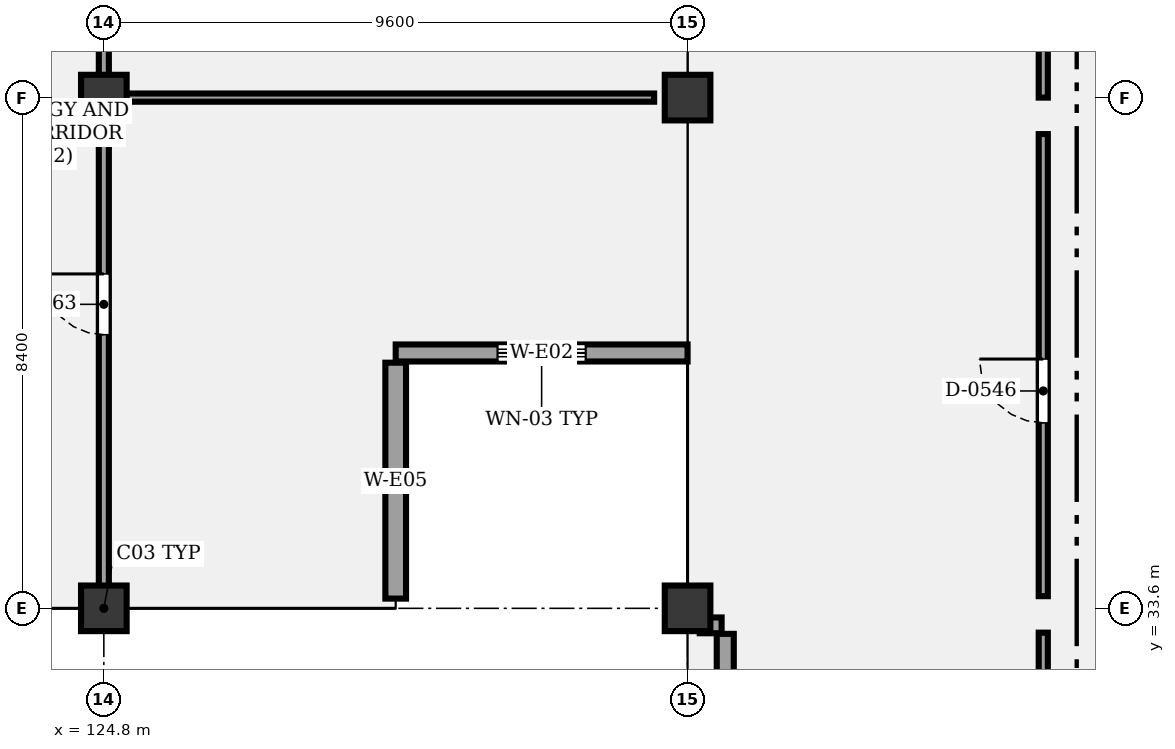
"""IFC4 building model, lengths in metres.
Left out: names, types, materials, properties, quantities, classifications, styles, units other than length and angle.
Written with IfcOpenShell. Run it as: python <this file> out.ifc"""

import sys

from ifc_helpers import new_model, si_unit, direction, frame, frame_2d, origin, origin_2d, place, context, subcontext, project, spatial, rectangle, extrude, element, fill, save


model = new_model("IFC4")
c1 = context("Model", 3, precision=1e-05, world=origin(), true_north=direction((0.0, 1.0)))
c2 = subcontext(c1, "Body", "Model", "MODEL_VIEW")
j1 = project(units=[si_unit("LENGTHUNIT", "METRE"), si_unit("PLANEANGLEUNIT", "RADIAN")], contexts=[c1])
p1 = place(None, origin())
s1 = spatial("IfcSite", under=j1, at=p1, CompositionType="ELEMENT")
p2 = place(p1, origin())
s2 = spatial("IfcBuilding", under=s1, at=p2, CompositionType="ELEMENT")
p3 = place(p2, frame((0.0, 0.0, 9.9)))
s3 = spatial("IfcBuildingStorey", under=s2, at=p3, CompositionType="ELEMENT", Elevation=9.9)
for number, where, z_axis, x_axis in (
    (1, (124.8, 33.6, 0.0), (0.0, 0.0, 1.0), (1.0, 0.0, 0.0)),
    (2, (124.8, 42.0, 0.0), (0.0, 0.0, 1.0), (1.0, 0.0, 0.0)),
    (3, (134.4, 33.6, 0.0), (0.0, 0.0, 1.0), (1.0, 0.0, 0.0)),
    (4, (134.4, 42.0, 0.0), (0.0, 0.0, 1.0), (1.0, 0.0, 0.0)),
):
    element("IfcColumn", number, at=place(p3, frame(where, z_axis=z_axis, x_axis=x_axis)), inside=s3, PredefinedType="COLUMN", context=c2, shape_type="SweptSolid", body=[
        extrude(rectangle(XDim=0.75, YDim=0.75, at=origin_2d()), origin(), (0.0, 0.0, 1.0), 3.6),
    ])
p4 = place(p3, frame((134.4, 37.8, 0.0), z_axis=(0.0, 0.0, 1.0), x_axis=(-1.0, 0.0, 0.0)))
e5 = element("IfcWall", 5, at=p4, inside=s3, PredefinedType="SOLIDWALL", context=c2, shape_type="SweptSolid", body=[
    extrude(rectangle(XDim=4.8, YDim=0.28, at=frame_2d((2.4, 0.0))), origin(), (0.0, 0.0, 1.0), 2.57),
])
p5 = place(p4, frame((1.675, 0.0, 0.85)))
e6 = element("IfcOpeningElement", 6, at=p5, cuts=e5, PredefinedType="OPENING", context=c2, shape_type="SweptSolid", body=[
    extrude(rectangle(XDim=1.45, YDim=1.2, at=frame_2d((0.725, 0.6))), frame((0.0, 0.15, 0.0), z_axis=(0.0, -1.0, 0.0), x_axis=(1.0, 0.0, 0.0)), (0.0, 0.0, 1.0), 0.3),
])
p6 = place(p3, frame((129.6, 37.64, 0.0), z_axis=(0.0, 0.0, 1.0), x_axis=(0.0, -1.0, 0.0)))
e7 = element("IfcWall", 7, at=p6, inside=s3, PredefinedType="SOLIDWALL", context=c2, shape_type="SweptSolid", body=[
    extrude(rectangle(XDim=3.88, YDim=0.34, at=frame_2d((1.94, 0.0))), origin(), (0.0, 0.0, 1.0), 2.57),
])
p7 = place(p3, frame((134.6, 33.32, 0.0), z_axis=(0.0, 0.0, 1.0), x_axis=(1.0, 0.0, 0.0)))
e8 = element("IfcWall", 8, at=p7, inside=s3, PredefinedType="SOLIDWALL", context=c2, shape_type="SweptSolid", body=[
    extrude(rectangle(XDim=0.36, YDim=0.26, at=frame_2d((0.18, 0.0))), origin(), (0.0, 0.0, 1.0), 2.57),
])
p8 = place(p3, frame((135.02, 17.22, 0.0), z_axis=(0.0, 0.0, 1.0), x_axis=(0.0, 1.0, 0.0)))
e9 = element("IfcWall", 9, at=p8, inside=s3, PredefinedType="SOLIDWALL", context=c2, shape_type="SweptSolid", body=[
    extrude(rectangle(XDim=15.96, YDim=0.28, at=frame_2d((7.98, 0.0))), origin(), (0.0, 0.0, 1.0), 2.57),
])
p9 = place(p3, frame((124.8, 33.85, 0.0), z_axis=(0.0, 0.0, 1.0), x_axis=(0.0, 1.0, 0.0)))
e10 = element("IfcWall", 10, at=p9, inside=s3, PredefinedType="PARTITIONING", context=c2, shape_type="SweptSolid", body=[
    extrude(rectangle(XDim=7.9, YDim=0.165, at=frame_2d((3.95, 0.0))), origin(), (0.0, 0.0, 1.0), 2.48),
])
p10 = place(p9, frame((4.25, 0.0, 0.0)))
e11 = element("IfcOpeningElement", 11, at=p10, cuts=e10, PredefinedType="OPENING", context=c2, shape_type="SweptSolid", body=[
    extrude(rectangle(XDim=1.0, YDim=2.2, at=frame_2d((0.5, 1.1))), frame((0.0, 0.093, 0.0), z_axis=(0.0, -1.0, 0.0), x_axis=(1.0, 0.0, 0.0)), (0.0, 0.0, 1.0), 0.185),
])
p11 = place(p3, frame((124.8, 42.25, 0.0), z_axis=(0.0, 0.0, 1.0), x_axis=(0.0, 1.0, 0.0)))
e12 = element("IfcWall", 12, at=p11, inside=s3, PredefinedType="PARTITIONING", context=c2, shape_type="SweptSolid", body=[
    extrude(rectangle(XDim=7.9, YDim=0.165, at=frame_2d((3.95, 0.0))), origin(), (0.0, 0.0, 1.0), 2.48),
])
p12 = place(p11, frame((4.25, 0.0, 0.0)))
e13 = element("IfcOpeningElement", 13, at=p12, cuts=e12, PredefinedType="OPENING", context=c2, shape_type="SweptSolid", body=[
    extrude(rectangle(XDim=0.9, YDim=2.1, at=frame_2d((0.45, 1.05))), frame((0.0, 0.093, 0.0), z_axis=(0.0, -1.0, 0.0), x_axis=(1.0, 0.0, 0.0)), (0.0, 0.0, 1.0), 0.185),
])
p13 = place(p3, frame((124.95, 42.0, 0.0), z_axis=(0.0, 0.0, 1.0), x_axis=(1.0, 0.0, 0.0)))
e14 = element("IfcWall", 14, at=p13, inside=s3, PredefinedType="PARTITIONING", context=c2, shape_type="SweptSolid", body=[
    extrude(rectangle(XDim=8.9, YDim=0.135, at=frame_2d((4.45, 0.0))), origin(), (0.0, 0.0, 1.0), 2.48),
])
p14 = place(p3, frame((140.25, 25.6, 0.0), z_axis=(0.0, 0.0, 1.0), x_axis=(0.0, 1.0, 0.0)))
e15 = element("IfcWall", 15, at=p14, inside=s3, PredefinedType="PARTITIONING", context=c2, shape_type="SweptSolid", body=[
    extrude(rectangle(XDim=7.6, YDim=0.15, at=frame_2d((3.8, 0.0))), origin(), (0.0, 0.0, 1.0), 2.48),
])
p15 = place(p14, frame((3.2, 0.0, 0.0)))
e16 = element("IfcOpeningElement", 16, at=p15, cuts=e15, PredefinedType="OPENING", context=c2, shape_type="SweptSolid", body=[
    extrude(rectangle(XDim=1.05, YDim=2.1, at=frame_2d((0.525, 1.05))), frame((0.0, 0.085, 0.0), z_axis=(0.0, -1.0, 0.0), x_axis=(1.0, 0.0, 0.0)), (0.0, 0.0, 1.0), 0.17),
])
p16 = place(p3, frame((140.25, 33.8, 0.0), z_axis=(0.0, 0.0, 1.0), x_axis=(0.0, 1.0, 0.0)))
e17 = element("IfcWall", 17, at=p16, inside=s3, PredefinedType="PARTITIONING", context=c2, shape_type="SweptSolid", body=[
    extrude(rectangle(XDim=7.6, YDim=0.15, at=frame_2d((3.8, 0.0))), origin(), (0.0, 0.0, 1.0), 2.48),
])
p17 = place(p16, frame((2.85, 0.0, 0.0)))
e18 = element("IfcOpeningElement", 18, at=p17, cuts=e17, PredefinedType="OPENING", context=c2, shape_type="SweptSolid", body=[
    extrude(rectangle(XDim=1.05, YDim=2.1, at=frame_2d((0.525, 1.05))), frame((0.0, 0.085, 0.0), z_axis=(0.0, -1.0, 0.0), x_axis=(1.0, 0.0, 0.0)), (0.0, 0.0, 1.0), 0.17),
])
p18 = place(p3, frame((140.25, 42.0, 0.0), z_axis=(0.0, 0.0, 1.0), x_axis=(0.0, 1.0, 0.0)))
e19 = element("IfcWall", 19, at=p18, inside=s3, PredefinedType="PARTITIONING", context=c2, shape_type="SweptSolid", body=[
    extrude(rectangle(XDim=7.6, YDim=0.15, at=frame_2d((3.8, 0.0))), origin(), (0.0, 0.0, 1.0), 2.48),
])
p19 = place(p18, frame((2.85, 0.0, 0.0)))
e20 = element("IfcOpeningElement", 20, at=p19, cuts=e19, PredefinedType="OPENING", context=c2, shape_type="SweptSolid", body=[
    extrude(rectangle(XDim=1.05, YDim=2.1, at=frame_2d((0.525, 1.05))), frame((0.0, 0.085, 0.0), z_axis=(0.0, -1.0, 0.0), x_axis=(1.0, 0.0, 0.0)), (0.0, 0.0, 1.0), 0.17),
])
p20 = place(p5, origin())
e21 = element("IfcWindow", 21, at=p20, inside=s3, PartitioningType="SINGLE_PANEL", PredefinedType="WINDOW", context=c2, shape_type="SweptSolid", body=[
    extrude(rectangle(XDim=1.45, YDim=1.2, at=frame_2d((0.725, 0.6))), frame((0.0, 0.03, 0.0), z_axis=(0.0, -1.0, 0.0), x_axis=(1.0, 0.0, 0.0)), (0.0, 0.0, 1.0), 0.06),
])
fill(e6, e21)
p21 = place(p10, origin())
e22 = element("IfcDoor", 22, at=p21, inside=s3, OperationType="SINGLE_SWING_RIGHT", PredefinedType="DOOR", context=c2, shape_type="SweptSolid", body=[
    extrude(rectangle(XDim=1.0, YDim=2.2, at=frame_2d((0.5, 1.1))), frame((0.0, 0.025, 0.0), z_axis=(0.0, -1.0, 0.0), x_axis=(1.0, 0.0, 0.0)), (0.0, 0.0, 1.0), 0.05),
])
fill(e11, e22)
p22 = place(p17, origin())
e23 = element("IfcDoor", 23, at=p22, inside=s3, OperationType="SINGLE_SWING_RIGHT", PredefinedType="DOOR", context=c2, shape_type="SweptSolid", body=[
    extrude(rectangle(XDim=1.05, YDim=2.1, at=frame_2d((0.525, 1.05))), frame((0.0, 0.025, 0.0), z_axis=(0.0, -1.0, 0.0), x_axis=(1.0, 0.0, 0.0)), (0.0, 0.0, 1.0), 0.05),
])
fill(e18, e23)
save(model, sys.argv[1])
